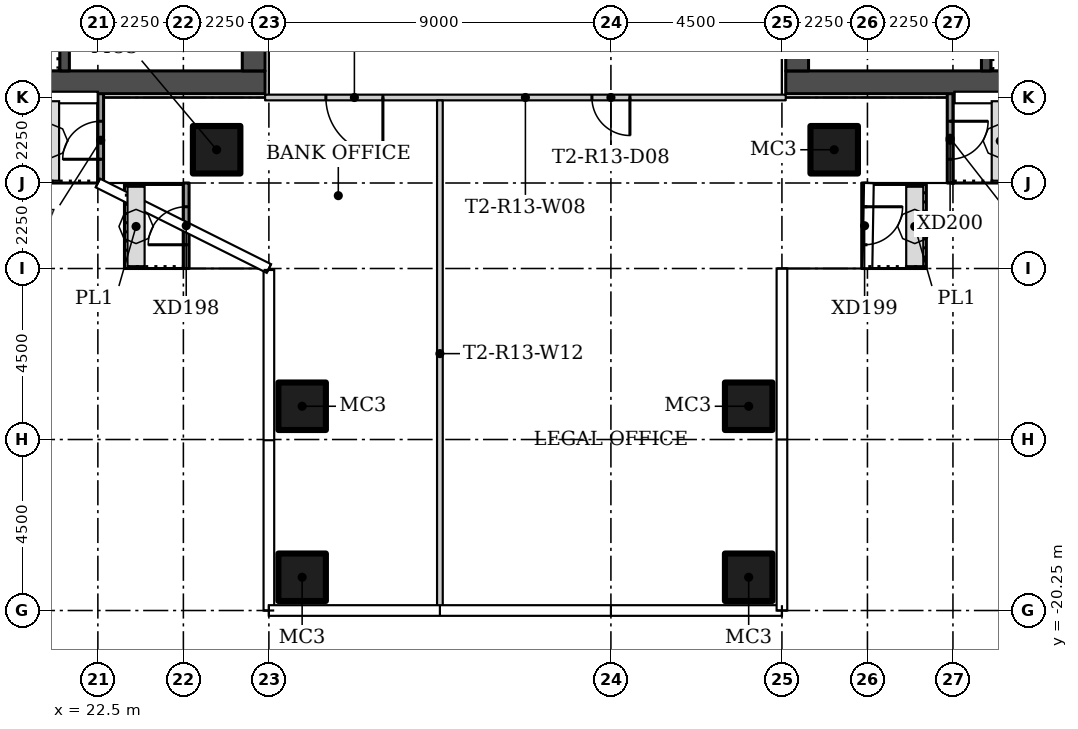
"""IFC4 building model, lengths in metres.
Left out: names, types, materials, properties, quantities, classifications, styles, units other than length and angle.
Written with IfcOpenShell. Run it as: python <this file> out.ifc"""

import sys

from ifc_helpers import new_model, si_unit, direction, frame, frame_2d, origin, origin_2d, place, context, subcontext, project, spatial, rectangle, hollow_rectangle, extrude, element, fill, save


model = new_model("IFC4")
c1 = context("Model", 3, precision=1e-05, world=origin(), true_north=direction((0.0, 1.0)))
c2 = subcontext(c1, "Body", "Model", "MODEL_VIEW")
j1 = project(units=[si_unit("LENGTHUNIT", "METRE"), si_unit("PLANEANGLEUNIT", "RADIAN")], contexts=[c1])
p1 = place(None, origin())
s1 = spatial("IfcSite", under=j1, at=p1, CompositionType="ELEMENT")
p2 = place(p1, origin())
s2 = spatial("IfcBuilding", under=s1, at=p2, CompositionType="ELEMENT")
p3 = place(p2, frame((0.0, 0.0, 124.8)))
s3 = spatial("IfcBuildingStorey", under=s2, at=p3, CompositionType="ELEMENT", Elevation=124.8)
for number, where in (
    (1, (25.625, -8.125, 0.0)),
    (2, (41.875, -8.125, 0.0)),
    (3, (39.625, -14.875, 0.0)),
    (4, (39.625, -19.375, 0.0)),
    (5, (27.875, -14.875, 0.0)),
    (6, (27.875, -19.375, 0.0)),
):
    element("IfcColumn", number, at=place(p3, frame(where)), inside=s3, PredefinedType="COLUMN", context=c2, shape_type="SweptSolid", body=[
        extrude(hollow_rectangle(XDim=1.25, YDim=1.25, WallThickness=0.05, at=origin_2d()), origin(), (0.0, 0.0, 1.0), 3.45),
    ])
p4 = place(p3, frame((40.6, -6.75, 0.0), z_axis=(0.0, 0.0, 1.0), x_axis=(-1.0, 0.0, 0.0)))
e7 = element("IfcWall", 7, at=p4, inside=s3, PredefinedType="PARTITIONING", context=c2, shape_type="SweptSolid", body=[
    extrude(rectangle(XDim=13.7, YDim=0.15, at=frame_2d((6.85, 0.0))), origin(), (0.0, 0.0, 1.0), 3.45),
])
p5 = place(p4, frame((10.6, 0.0, 0.0)))
e8 = element("IfcOpeningElement", 8, at=p5, cuts=e7, PredefinedType="OPENING", context=c2, shape_type="SweptSolid", body=[
    extrude(rectangle(XDim=1.5, YDim=2.1, at=frame_2d((0.75, 1.05))), frame((0.0, 0.085, 0.0), z_axis=(0.0, -1.0, 0.0), x_axis=(1.0, 0.0, 0.0)), (0.0, 0.0, 1.0), 0.17),
])
p6 = place(p4, frame((4.1, 0.0, 0.0)))
e9 = element("IfcOpeningElement", 9, at=p6, cuts=e7, PredefinedType="OPENING", context=c2, shape_type="SweptSolid", body=[
    extrude(rectangle(XDim=1.0, YDim=2.4, at=frame_2d((0.5, 1.2))), frame((0.0, 0.085, 0.0), z_axis=(0.0, -1.0, 0.0), x_axis=(1.0, 0.0, 0.0)), (0.0, 0.0, 1.0), 0.17),
])
p7 = place(p3, frame((31.5, -6.825, 0.0), z_axis=(0.0, 0.0, 1.0), x_axis=(0.0, -1.0, 0.0)))
e10 = element("IfcWall", 10, at=p7, inside=s3, PredefinedType="PARTITIONING", context=c2, shape_type="SweptSolid", body=[
    extrude(rectangle(XDim=13.33, YDim=0.15, at=frame_2d((6.665, 0.0))), origin(), (0.0, 0.0, 1.0), 3.45),
])
p8 = place(p3, frame((22.575, -9.0, 0.0), z_axis=(0.0, 0.0, 1.0), x_axis=(0.0, 1.0, 0.0)))
e11 = element("IfcWall", 11, at=p8, inside=s3, PredefinedType="SOLIDWALL", context=c2, shape_type="SweptSolid", body=[
    extrude(rectangle(XDim=2.357, YDim=0.15, at=frame_2d((1.178, 0.0))), origin(), (0.0, 0.0, 1.0), 3.45),
])
p9 = place(p8, frame((0.625, 0.0, 0.0)))
e12 = element("IfcOpeningElement", 12, at=p9, cuts=e11, PredefinedType="OPENING", context=c2, shape_type="SweptSolid", body=[
    extrude(rectangle(XDim=1.0, YDim=2.4, at=frame_2d((0.5, 1.2))), frame((0.0, 0.085, 0.0), z_axis=(0.0, -1.0, 0.0), x_axis=(1.0, 0.0, 0.0)), (0.0, 0.0, 1.0), 0.17),
])
p10 = place(p3, frame((24.825, -11.25, 0.0), z_axis=(0.0, 0.0, 1.0), x_axis=(0.0, 1.0, 0.0)))
e13 = element("IfcWall", 13, at=p10, inside=s3, PredefinedType="SOLIDWALL", context=c2, shape_type="SweptSolid", body=[
    extrude(rectangle(XDim=2.25, YDim=0.15, at=frame_2d((1.125, 0.0))), origin(), (0.0, 0.0, 1.0), 3.45),
])
p11 = place(p10, frame((0.625, 0.0, 0.0)))
e14 = element("IfcOpeningElement", 14, at=p11, cuts=e13, PredefinedType="OPENING", context=c2, shape_type="SweptSolid", body=[
    extrude(rectangle(XDim=1.0, YDim=2.4, at=frame_2d((0.5, 1.2))), frame((0.0, 0.085, 0.0), z_axis=(0.0, -1.0, 0.0), x_axis=(1.0, 0.0, 0.0)), (0.0, 0.0, 1.0), 0.17),
])
p12 = place(p3, frame((42.675, -9.0, 0.0), z_axis=(0.0, 0.0, 1.0), x_axis=(0.0, -1.0, 0.0)))
e15 = element("IfcWall", 15, at=p12, inside=s3, PredefinedType="SOLIDWALL", context=c2, shape_type="SweptSolid", body=[
    extrude(rectangle(XDim=2.25, YDim=0.15, at=frame_2d((1.125, 0.0))), origin(), (0.0, 0.0, 1.0), 3.45),
])
p13 = place(p12, frame((0.625, 0.0, 0.0)))
e16 = element("IfcOpeningElement", 16, at=p13, cuts=e15, PredefinedType="OPENING", context=c2, shape_type="SweptSolid", body=[
    extrude(rectangle(XDim=1.0, YDim=2.4, at=frame_2d((0.5, 1.2))), frame((0.0, 0.085, 0.0), z_axis=(0.0, -1.0, 0.0), x_axis=(1.0, 0.0, 0.0)), (0.0, 0.0, 1.0), 0.17),
])
p14 = place(p3, frame((44.925, -6.643, 0.0), z_axis=(0.0, 0.0, 1.0), x_axis=(0.0, -1.0, 0.0)))
e17 = element("IfcWall", 17, at=p14, inside=s3, PredefinedType="SOLIDWALL", context=c2, shape_type="SweptSolid", body=[
    extrude(rectangle(XDim=2.357, YDim=0.15, at=frame_2d((1.178, 0.0))), origin(), (0.0, 0.0, 1.0), 3.45),
])
p15 = place(p14, frame((0.732, 0.0, 0.0)))
e18 = element("IfcOpeningElement", 18, at=p15, cuts=e17, PredefinedType="OPENING", context=c2, shape_type="SweptSolid", body=[
    extrude(rectangle(XDim=1.0, YDim=2.4, at=frame_2d((0.5, 1.2))), frame((0.0, 0.085, 0.0), z_axis=(0.0, -1.0, 0.0), x_axis=(1.0, 0.0, 0.0)), (0.0, 0.0, 1.0), 0.17),
])
p16 = place(p3, frame((13.6, -6.35, 0.0)))
e19 = element("IfcWall", 19, at=p16, inside=s3, PredefinedType="SHEAR", context=c2, shape_type="SweptSolid", body=[
    extrude(rectangle(XDim=13.3, YDim=0.6, at=frame_2d((6.65, 0.0))), origin(), (0.0, 0.0, 1.0), 3.45),
])
p17 = place(p3, frame((26.6, 6.05, 0.0), z_axis=(0.0, 0.0, 1.0), x_axis=(0.0, -1.0, 0.0)))
e20 = element("IfcWall", 20, at=p17, inside=s3, PredefinedType="SHEAR", context=c2, shape_type="SweptSolid", body=[
    extrude(rectangle(XDim=12.1, YDim=0.6, at=frame_2d((6.05, 0.0))), origin(), (0.0, 0.0, 1.0), 3.45),
])
p18 = place(p17, frame((10.1, 0.0, 0.0)))
e21 = element("IfcOpeningElement", 21, at=p18, cuts=e20, PredefinedType="OPENING", context=c2, shape_type="SweptSolid", body=[
    extrude(rectangle(XDim=1.2, YDim=2.1, at=frame_2d((0.6, 1.05))), frame((0.0, 0.31, 0.0), z_axis=(0.0, -1.0, 0.0), x_axis=(1.0, 0.0, 0.0)), (0.0, 0.0, 1.0), 0.62),
])
p19 = place(p17, frame((3.9, 0.0, 0.0)))
e22 = element("IfcOpeningElement", 22, at=p19, cuts=e20, PredefinedType="OPENING", context=c2, shape_type="SweptSolid", body=[
    extrude(rectangle(XDim=1.8, YDim=2.4, at=frame_2d((0.9, 1.2))), frame((0.0, 0.31, 0.0), z_axis=(0.0, -1.0, 0.0), x_axis=(1.0, 0.0, 0.0)), (0.0, 0.0, 1.0), 0.62),
])
p20 = place(p3, frame((21.625, -6.05, 0.0), z_axis=(0.0, 0.0, 1.0), x_axis=(0.0, 1.0, 0.0)))
e23 = element("IfcWall", 23, at=p20, inside=s3, PredefinedType="SHEAR", context=c2, shape_type="SweptSolid", body=[
    extrude(rectangle(XDim=2.55, YDim=0.25, at=frame_2d((1.275, 0.0))), origin(), (0.0, 0.0, 1.0), 3.45),
])
p21 = place(p3, frame((53.9, -6.35, 0.0), z_axis=(0.0, 0.0, 1.0), x_axis=(-1.0, 0.0, 0.0)))
e24 = element("IfcWall", 24, at=p21, inside=s3, PredefinedType="SHEAR", context=c2, shape_type="SweptSolid", body=[
    extrude(rectangle(XDim=13.3, YDim=0.6, at=frame_2d((6.65, 0.0))), origin(), (0.0, 0.0, 1.0), 3.45),
])
p22 = place(p3, frame((40.9, -6.05, 0.0), z_axis=(0.0, 0.0, 1.0), x_axis=(0.0, 1.0, 0.0)))
e25 = element("IfcWall", 25, at=p22, inside=s3, PredefinedType="SHEAR", context=c2, shape_type="SweptSolid", body=[
    extrude(rectangle(XDim=12.1, YDim=0.6, at=frame_2d((6.05, 0.0))), origin(), (0.0, 0.0, 1.0), 3.45),
])
p23 = place(p22, frame((0.8, 0.0, 0.0)))
e26 = element("IfcOpeningElement", 26, at=p23, cuts=e25, PredefinedType="OPENING", context=c2, shape_type="SweptSolid", body=[
    extrude(rectangle(XDim=1.2, YDim=2.1, at=frame_2d((0.6, 1.05))), frame((0.0, 0.31, 0.0), z_axis=(0.0, -1.0, 0.0), x_axis=(1.0, 0.0, 0.0)), (0.0, 0.0, 1.0), 0.62),
])
p24 = place(p22, frame((6.4, 0.0, 0.0)))
e27 = element("IfcOpeningElement", 27, at=p24, cuts=e25, PredefinedType="OPENING", context=c2, shape_type="SweptSolid", body=[
    extrude(rectangle(XDim=1.8, YDim=2.4, at=frame_2d((0.9, 1.2))), frame((0.0, 0.31, 0.0), z_axis=(0.0, -1.0, 0.0), x_axis=(1.0, 0.0, 0.0)), (0.0, 0.0, 1.0), 0.62),
])
p25 = place(p3, frame((45.875, -6.05, 0.0), z_axis=(0.0, 0.0, 1.0), x_axis=(0.0, 1.0, 0.0)))
e28 = element("IfcWall", 28, at=p25, inside=s3, PredefinedType="SHEAR", context=c2, shape_type="SweptSolid", body=[
    extrude(rectangle(XDim=2.55, YDim=0.25, at=frame_2d((1.275, 0.0))), origin(), (0.0, 0.0, 1.0), 3.45),
])
p26 = place(p5, origin())
e29 = element("IfcDoor", 29, at=p26, inside=s3, OperationType="DOUBLE_DOOR_SINGLE_SWING", PredefinedType="DOOR", context=c2, shape_type="SweptSolid", body=[
    extrude(rectangle(XDim=1.5, YDim=2.1, at=frame_2d((0.75, 1.05))), frame((0.0, 0.025, 0.0), z_axis=(0.0, -1.0, 0.0), x_axis=(1.0, 0.0, 0.0)), (0.0, 0.0, 1.0), 0.05),
])
fill(e8, e29)
p27 = place(p6, origin())
e30 = element("IfcDoor", 30, at=p27, inside=s3, OperationType="SINGLE_SWING_LEFT", PredefinedType="DOOR", context=c2, shape_type="SweptSolid", body=[
    extrude(rectangle(XDim=1.0, YDim=2.4, at=frame_2d((0.5, 1.2))), frame((0.0, 0.025, 0.0), z_axis=(0.0, -1.0, 0.0), x_axis=(1.0, 0.0, 0.0)), (0.0, 0.0, 1.0), 0.05),
])
fill(e9, e30)
p28 = place(p9, origin())
e31 = element("IfcDoor", 31, at=p28, inside=s3, OperationType="SINGLE_SWING_LEFT", PredefinedType="DOOR", context=c2, shape_type="SweptSolid", body=[
    extrude(rectangle(XDim=1.0, YDim=2.4, at=frame_2d((0.5, 1.2))), frame((0.0, 0.025, 0.0), z_axis=(0.0, -1.0, 0.0), x_axis=(1.0, 0.0, 0.0)), (0.0, 0.0, 1.0), 0.05),
])
fill(e12, e31)
p29 = place(p11, origin())
e32 = element("IfcDoor", 32, at=p29, inside=s3, OperationType="SINGLE_SWING_RIGHT", PredefinedType="DOOR", context=c2, shape_type="SweptSolid", body=[
    extrude(rectangle(XDim=1.0, YDim=2.4, at=frame_2d((0.5, 1.2))), frame((0.0, 0.025, 0.0), z_axis=(0.0, -1.0, 0.0), x_axis=(1.0, 0.0, 0.0)), (0.0, 0.0, 1.0), 0.05),
])
fill(e14, e32)
p30 = place(p13, origin())
e33 = element("IfcDoor", 33, at=p30, inside=s3, OperationType="SINGLE_SWING_LEFT", PredefinedType="DOOR", context=c2, shape_type="SweptSolid", body=[
    extrude(rectangle(XDim=1.0, YDim=2.4, at=frame_2d((0.5, 1.2))), frame((0.0, 0.025, 0.0), z_axis=(0.0, -1.0, 0.0), x_axis=(1.0, 0.0, 0.0)), (0.0, 0.0, 1.0), 0.05),
])
fill(e16, e33)
p31 = place(p15, origin())
e34 = element("IfcDoor", 34, at=p31, inside=s3, OperationType="SINGLE_SWING_RIGHT", PredefinedType="DOOR", context=c2, shape_type="SweptSolid", body=[
    extrude(rectangle(XDim=1.0, YDim=2.4, at=frame_2d((0.5, 1.2))), frame((0.0, 0.025, 0.0), z_axis=(0.0, -1.0, 0.0), x_axis=(1.0, 0.0, 0.0)), (0.0, 0.0, 1.0), 0.05),
])
fill(e18, e34)
save(model, sys.argv[1])
